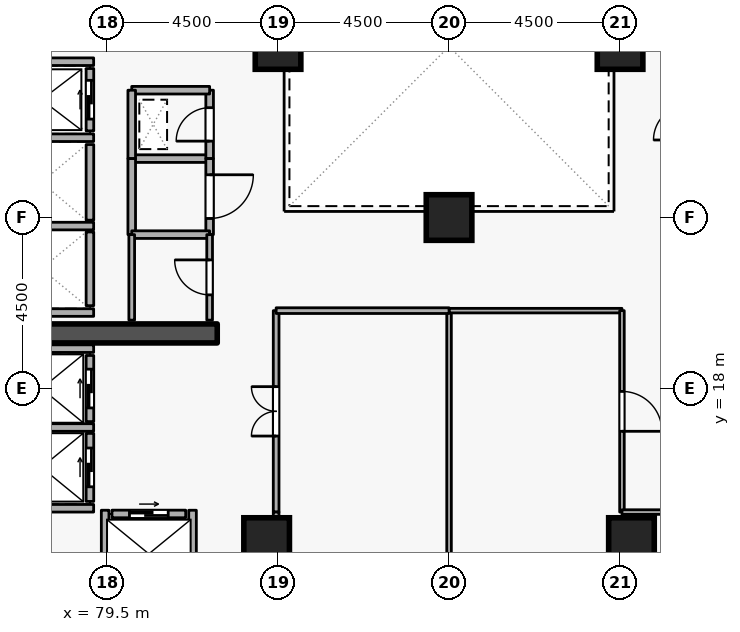
"""IFC4 building model, lengths in metres.
Left out: names, types, materials, properties, quantities, classifications, styles, units other than length and angle.
Written with IfcOpenShell. Run it as: python <this file> out.ifc"""

import sys

from ifc_helpers import new_model, si_unit, direction, frame, frame_2d, origin, origin_2d, place, context, subcontext, project, spatial, rectangle, extrude, element, fill, save


model = new_model("IFC4")
c1 = context("Model", 3, precision=1e-05, world=origin(), true_north=direction((0.0, 1.0)))
c2 = subcontext(c1, "Body", "Model", "MODEL_VIEW")
j1 = project(units=[si_unit("LENGTHUNIT", "METRE"), si_unit("PLANEANGLEUNIT", "RADIAN")], contexts=[c1])
p1 = place(None, origin())
s1 = spatial("IfcSite", under=j1, at=p1, CompositionType="ELEMENT")
p2 = place(p1, origin())
s2 = spatial("IfcBuilding", under=s1, at=p2, CompositionType="ELEMENT")
p3 = place(p2, frame((0.0, 0.0, 126.9)))
s3 = spatial("IfcBuildingStorey", under=s2, at=p3, CompositionType="ELEMENT", Elevation=126.9)
p4 = place(p3, frame((76.6, 19.45, 0.0), z_axis=(0.0, 0.0, 1.0), x_axis=(1.0, 0.0, 0.0)))
e1 = element("IfcWall", 1, at=p4, inside=s3, PredefinedType="SHEAR", context=c2, shape_type="SweptSolid", body=[
    extrude(rectangle(XDim=5.8, YDim=0.5, at=frame_2d((2.9, 0.0))), origin(), (0.0, 0.0, 1.0), 3.6),
])
for number, where, z_axis, x_axis in (
    (2, (93.3, 14.0, 0.0), (0.0, 0.0, 1.0), (1.0, 0.0, 0.0)),
    (3, (83.7, 14.0, 0.0), (0.0, 0.0, 1.0), (1.0, 0.0, 0.0)),
    (4, (93.0, 27.0, 0.0), (0.0, 0.0, 1.0), (1.0, 0.0, 0.0)),
    (5, (84.0, 27.0, 0.0), (0.0, 0.0, 1.0), (1.0, 0.0, 0.0)),
    (6, (88.5, 22.5, 0.0), (0.0, 0.0, 1.0), (1.0, 0.0, 0.0)),
):
    element("IfcColumn", number, at=place(p3, frame(where, z_axis=z_axis, x_axis=x_axis)), inside=s3, PredefinedType="COLUMN", context=c2, shape_type="SweptSolid", body=[
        extrude(rectangle(XDim=1.2, YDim=1.2, at=origin_2d()), origin(), (0.0, 0.0, 1.0), 3.6),
    ])
p5 = place(p3, frame((79.05, 24.78, 0.0), z_axis=(0.0, 0.0, 1.0), x_axis=(0.0, 1.0, 0.0)))
e7 = element("IfcWall", 7, at=p5, inside=s3, PredefinedType="STANDARD", context=c2, shape_type="SweptSolid", body=[
    extrude(rectangle(XDim=1.64, YDim=0.2, at=frame_2d((0.82, 0.0))), origin(), (0.0, 0.0, 1.0), 3.34),
])
p6 = place(p5, frame((0.31, 0.0, 0.0)))
e8 = element("IfcOpeningElement", 8, at=p6, cuts=e7, PredefinedType="OPENING", context=c2, shape_type="SweptSolid", body=[
    extrude(rectangle(XDim=1.02, YDim=2.06, at=frame_2d((0.51, 1.03))), frame((0.0, 0.11, 0.0), z_axis=(0.0, -1.0, 0.0), x_axis=(1.0, 0.0, 0.0)), (0.0, 0.0, 1.0), 0.22),
])
p7 = place(p3, frame((79.05, 22.43, 0.0), z_axis=(0.0, 0.0, 1.0), x_axis=(0.0, 1.0, 0.0)))
e9 = element("IfcWall", 9, at=p7, inside=s3, PredefinedType="STANDARD", context=c2, shape_type="SweptSolid", body=[
    extrude(rectangle(XDim=1.99, YDim=0.2, at=frame_2d((0.995, 0.0))), origin(), (0.0, 0.0, 1.0), 3.34),
])
p8 = place(p3, frame((79.05, 20.18, 0.0), z_axis=(0.0, 0.0, 1.0), x_axis=(0.0, 1.0, 0.0)))
e10 = element("IfcWall", 10, at=p8, inside=s3, PredefinedType="STANDARD", context=c2, shape_type="SweptSolid", body=[
    extrude(rectangle(XDim=1.94, YDim=0.2, at=frame_2d((0.97, 0.0))), origin(), (0.0, 0.0, 1.0), 3.34),
])
p9 = place(p3, frame((79.05, 17.13, 0.0), z_axis=(0.0, 0.0, 1.0), x_axis=(0.0, 1.0, 0.0)))
e11 = element("IfcWall", 11, at=p9, inside=s3, PredefinedType="STANDARD", context=c2, shape_type="SweptSolid", body=[
    extrude(rectangle(XDim=1.74, YDim=0.2, at=frame_2d((0.87, 0.0))), origin(), (0.0, 0.0, 1.0), 3.34),
])
p10 = place(p9, frame((0.36, 0.0, 0.0)))
e12 = element("IfcOpeningElement", 12, at=p10, cuts=e11, PredefinedType="OPENING", context=c2, shape_type="SweptSolid", body=[
    extrude(rectangle(XDim=1.02, YDim=2.06, at=frame_2d((0.51, 1.03))), frame((0.0, 0.11, 0.0), z_axis=(0.0, -1.0, 0.0), x_axis=(1.0, 0.0, 0.0)), (0.0, 0.0, 1.0), 0.22),
])
p11 = place(p3, frame((79.05, 15.03, 0.0), z_axis=(0.0, 0.0, 1.0), x_axis=(0.0, 1.0, 0.0)))
e13 = element("IfcWall", 13, at=p11, inside=s3, PredefinedType="STANDARD", context=c2, shape_type="SweptSolid", body=[
    extrude(rectangle(XDim=1.79, YDim=0.2, at=frame_2d((0.895, 0.0))), origin(), (0.0, 0.0, 1.0), 3.34),
])
p12 = place(p11, frame((0.385, 0.0, 0.0)))
e14 = element("IfcOpeningElement", 14, at=p12, cuts=e13, PredefinedType="OPENING", context=c2, shape_type="SweptSolid", body=[
    extrude(rectangle(XDim=1.02, YDim=2.06, at=frame_2d((0.51, 1.03))), frame((0.0, 0.11, 0.0), z_axis=(0.0, -1.0, 0.0), x_axis=(1.0, 0.0, 0.0)), (0.0, 0.0, 1.0), 0.22),
])
p13 = place(p3, frame((79.63, 14.7, 0.0), z_axis=(0.0, 0.0, 1.0), x_axis=(1.0, 0.0, 0.0)))
e15 = element("IfcWall", 15, at=p13, inside=s3, PredefinedType="STANDARD", context=c2, shape_type="SweptSolid", body=[
    extrude(rectangle(XDim=1.94, YDim=0.2, at=frame_2d((0.97, 0.0))), origin(), (0.0, 0.0, 1.0), 3.34),
])
p14 = place(p13, frame((0.46, 0.0, 0.0)))
e16 = element("IfcOpeningElement", 16, at=p14, cuts=e15, PredefinedType="OPENING", context=c2, shape_type="SweptSolid", body=[
    extrude(rectangle(XDim=1.02, YDim=2.06, at=frame_2d((0.51, 1.03))), frame((0.0, 0.11, 0.0), z_axis=(0.0, -1.0, 0.0), x_axis=(1.0, 0.0, 0.0)), (0.0, 0.0, 1.0), 0.22),
])
for number, where, z_axis, x_axis in (
    (17, (76.612, 26.6, 0.0), (0.0, 0.0, 1.0), (1.0, 0.0, 0.0)),
    (18, (76.612, 24.6, 0.0), (0.0, 0.0, 1.0), (1.0, 0.0, 0.0)),
    (19, (76.612, 22.275, 0.0), (0.0, 0.0, 1.0), (1.0, 0.0, 0.0)),
    (20, (76.612, 20.0, 0.0), (0.0, 0.0, 1.0), (1.0, 0.0, 0.0)),
):
    element("IfcWall", number, at=place(p3, frame(where, z_axis=z_axis, x_axis=x_axis)), inside=s3, PredefinedType="STANDARD", context=c2, shape_type="SweptSolid", body=[
        extrude(rectangle(XDim=2.536, YDim=0.2, at=frame_2d((1.268, 0.0))), origin(), (0.0, 0.0, 1.0), 3.34),
    ])
p15 = place(p3, frame((76.402, 19.05, 0.0), z_axis=(0.0, 0.0, 1.0), x_axis=(1.0, 0.0, 0.0)))
e21 = element("IfcWall", 21, at=p15, inside=s3, PredefinedType="STANDARD", context=c2, shape_type="SweptSolid", body=[
    extrude(rectangle(XDim=2.746, YDim=0.2, at=frame_2d((1.373, 0.0))), origin(), (0.0, 0.0, 1.0), 2.545),
])
p16 = place(p3, frame((76.402, 16.975, 0.0), z_axis=(0.0, 0.0, 1.0), x_axis=(1.0, 0.0, 0.0)))
e22 = element("IfcWall", 22, at=p16, inside=s3, PredefinedType="STANDARD", context=c2, shape_type="SweptSolid", body=[
    extrude(rectangle(XDim=2.746, YDim=0.2, at=frame_2d((1.373, 0.0))), origin(), (0.0, 0.0, 1.0), 3.34),
])
p17 = place(p3, frame((76.512, 14.85, 0.0), z_axis=(0.0, 0.0, 1.0), x_axis=(1.0, 0.0, 0.0)))
e23 = element("IfcWall", 23, at=p17, inside=s3, PredefinedType="STANDARD", context=c2, shape_type="SweptSolid", body=[
    extrude(rectangle(XDim=2.636, YDim=0.2, at=frame_2d((1.318, 0.0))), origin(), (0.0, 0.0, 1.0), 3.34),
])
for number, where, z_axis, x_axis in (
    (24, (81.75, 12.612, 0.0), (0.0, 0.0, 1.0), (0.0, 1.0, 0.0)),
    (25, (79.45, 12.612, 0.0), (0.0, 0.0, 1.0), (0.0, 1.0, 0.0)),
):
    element("IfcWall", number, at=place(p3, frame(where, z_axis=z_axis, x_axis=x_axis)), inside=s3, PredefinedType="STANDARD", context=c2, shape_type="SweptSolid", body=[
        extrude(rectangle(XDim=2.186, YDim=0.2, at=frame_2d((1.093, 0.0))), origin(), (0.0, 0.0, 1.0), 3.34),
    ])
p18 = place(p3, frame((80.15, 24.05, 0.0), z_axis=(0.0, 0.0, 1.0), x_axis=(1.0, 0.0, 0.0)))
e26 = element("IfcWall", 26, at=p18, inside=s3, PredefinedType="STANDARD", context=c2, shape_type="SweptSolid", body=[
    extrude(rectangle(XDim=2.05, YDim=0.2, at=frame_2d((1.025, 0.0))), origin(), (0.0, 0.0, 1.0), 3.34),
])
p19 = place(p3, frame((82.2, 24.05, 0.0), z_axis=(0.0, 0.0, 1.0), x_axis=(0.0, 1.0, 0.0)))
e27 = element("IfcWall", 27, at=p19, inside=s3, PredefinedType="STANDARD", context=c2, shape_type="SweptSolid", body=[
    extrude(rectangle(XDim=1.8, YDim=0.2, at=frame_2d((0.9, 0.0))), origin(), (0.0, 0.0, 1.0), 3.34),
])
p20 = place(p19, frame((0.46, 0.0, 0.0)))
e28 = element("IfcOpeningElement", 28, at=p20, cuts=e27, PredefinedType="OPENING", context=c2, shape_type="SweptSolid", body=[
    extrude(rectangle(XDim=0.88, YDim=2.04, at=frame_2d((0.44, 1.02))), frame((0.0, 0.11, 0.0), z_axis=(0.0, -1.0, 0.0), x_axis=(1.0, 0.0, 0.0)), (0.0, 0.0, 1.0), 0.22),
])
p21 = place(p3, frame((82.2, 25.85, 0.0), z_axis=(0.0, 0.0, 1.0), x_axis=(-1.0, 0.0, 0.0)))
e29 = element("IfcWall", 29, at=p21, inside=s3, PredefinedType="STANDARD", context=c2, shape_type="SweptSolid", body=[
    extrude(rectangle(XDim=2.05, YDim=0.2, at=frame_2d((1.025, 0.0))), origin(), (0.0, 0.0, 1.0), 3.34),
])
p22 = place(p3, frame((80.15, 25.85, 0.0), z_axis=(0.0, 0.0, 1.0), x_axis=(0.0, -1.0, 0.0)))
e30 = element("IfcWall", 30, at=p22, inside=s3, PredefinedType="STANDARD", context=c2, shape_type="SweptSolid", body=[
    extrude(rectangle(XDim=1.8, YDim=0.2, at=frame_2d((0.9, 0.0))), origin(), (0.0, 0.0, 1.0), 3.34),
])
p23 = place(p3, frame((80.15, 22.05, 0.0), z_axis=(0.0, 0.0, 1.0), x_axis=(0.0, 1.0, 0.0)))
e31 = element("IfcWall", 31, at=p23, inside=s3, PredefinedType="STANDARD", context=c2, shape_type="SweptSolid", body=[
    extrude(rectangle(XDim=2.0, YDim=0.2, at=frame_2d((1.0, 0.0))), origin(), (0.0, 0.0, 1.0), 3.34),
])
p24 = place(p3, frame((82.2, 24.05, 0.0), z_axis=(0.0, 0.0, 1.0), x_axis=(0.0, -1.0, 0.0)))
e32 = element("IfcWall", 32, at=p24, inside=s3, PredefinedType="STANDARD", context=c2, shape_type="SweptSolid", body=[
    extrude(rectangle(XDim=2.0, YDim=0.2, at=frame_2d((1.0, 0.0))), origin(), (0.0, 0.0, 1.0), 3.34),
])
p25 = place(p24, frame((0.425, 0.0, 0.0)))
e33 = element("IfcOpeningElement", 33, at=p25, cuts=e32, PredefinedType="OPENING", context=c2, shape_type="SweptSolid", body=[
    extrude(rectangle(XDim=1.15, YDim=2.1, at=frame_2d((0.575, 1.05))), frame((0.0, 0.11, 0.0), z_axis=(0.0, -1.0, 0.0), x_axis=(1.0, 0.0, 0.0)), (0.0, 0.0, 1.0), 0.22),
])
p26 = place(p3, frame((82.2, 22.05, 0.0), z_axis=(0.0, 0.0, 1.0), x_axis=(-1.0, 0.0, 0.0)))
e34 = element("IfcWall", 34, at=p26, inside=s3, PredefinedType="STANDARD", context=c2, shape_type="SweptSolid", body=[
    extrude(rectangle(XDim=2.05, YDim=0.2, at=frame_2d((1.025, 0.0))), origin(), (0.0, 0.0, 1.0), 3.34),
])
p27 = place(p3, frame((82.2, 19.8, 0.0), z_axis=(0.0, 0.0, 1.0), x_axis=(0.0, 1.0, 0.0)))
e35 = element("IfcWall", 35, at=p27, inside=s3, PredefinedType="PARTITIONING", context=c2, shape_type="SweptSolid", body=[
    extrude(rectangle(XDim=2.25, YDim=0.15, at=frame_2d((1.125, 0.0))), origin(), (0.0, 0.0, 1.0), 3.34),
])
p28 = place(p27, frame((0.665, 0.0, 0.0)))
e36 = element("IfcOpeningElement", 36, at=p28, cuts=e35, PredefinedType="OPENING", context=c2, shape_type="SweptSolid", body=[
    extrude(rectangle(XDim=0.92, YDim=2.08, at=frame_2d((0.46, 1.04))), frame((0.0, 0.085, 0.0), z_axis=(0.0, -1.0, 0.0), x_axis=(1.0, 0.0, 0.0)), (0.0, 0.0, 1.0), 0.17),
])
p29 = place(p3, frame((80.15, 22.05, 0.0), z_axis=(0.0, 0.0, 1.0), x_axis=(0.0, -1.0, 0.0)))
e37 = element("IfcWall", 37, at=p29, inside=s3, PredefinedType="PARTITIONING", context=c2, shape_type="SweptSolid", body=[
    extrude(rectangle(XDim=2.25, YDim=0.15, at=frame_2d((1.125, 0.0))), origin(), (0.0, 0.0, 1.0), 3.34),
])
p30 = place(p3, frame((88.5, 3.28, 0.0), z_axis=(0.0, 0.0, 1.0), x_axis=(0.0, 1.0, 0.0)))
e38 = element("IfcWall", 38, at=p30, inside=s3, PredefinedType="PARTITIONING", context=c2, shape_type="SweptSolid", body=[
    extrude(rectangle(XDim=16.77, YDim=0.12, at=frame_2d((8.385, 0.0))), origin(), (0.0, 0.0, 1.0), 2.932),
])
p31 = place(p3, frame((88.5, 20.05, 0.0), z_axis=(0.0, 0.0, 1.0), x_axis=(1.0, 0.0, 0.0)))
e39 = element("IfcWall", 39, at=p31, inside=s3, PredefinedType="PARTITIONING", context=c2, shape_type="SweptSolid", body=[
    extrude(rectangle(XDim=4.55, YDim=0.12, at=frame_2d((2.275, 0.0))), origin(), (0.0, 0.0, 1.0), 3.34),
])
p32 = place(p3, frame((93.05, 20.05, 0.0), z_axis=(0.0, 0.0, 1.0), x_axis=(0.0, -1.0, 0.0)))
e40 = element("IfcWall", 40, at=p32, inside=s3, PredefinedType="PARTITIONING", context=c2, shape_type="SweptSolid", body=[
    extrude(rectangle(XDim=5.3, YDim=0.12, at=frame_2d((2.65, 0.0))), origin(), (0.0, 0.0, 1.0), 3.34),
])
p33 = place(p32, frame((2.125, 0.0, 0.0)))
e41 = element("IfcOpeningElement", 41, at=p33, cuts=e40, PredefinedType="OPENING", context=c2, shape_type="SweptSolid", body=[
    extrude(rectangle(XDim=1.05, YDim=2.1, at=frame_2d((0.525, 1.05))), frame((0.0, 0.07, 0.0), z_axis=(0.0, -1.0, 0.0), x_axis=(1.0, 0.0, 0.0)), (0.0, 0.0, 1.0), 0.14),
])
p34 = place(p3, frame((93.05, 14.75, 0.0), z_axis=(0.0, 0.0, 1.0), x_axis=(1.0, 0.0, 0.0)))
e42 = element("IfcWall", 42, at=p34, inside=s3, PredefinedType="PARTITIONING", context=c2, shape_type="SweptSolid", body=[
    extrude(rectangle(XDim=1.75, YDim=0.12, at=frame_2d((0.875, 0.0))), origin(), (0.0, 0.0, 1.0), 3.34),
])
p35 = place(p3, frame((83.95, 14.75, 0.0), z_axis=(0.0, 0.0, 1.0), x_axis=(0.0, 1.0, 0.0)))
e43 = element("IfcWall", 43, at=p35, inside=s3, PredefinedType="PARTITIONING", context=c2, shape_type="SweptSolid", body=[
    extrude(rectangle(XDim=5.3, YDim=0.15, at=frame_2d((2.65, 0.0))), origin(), (0.0, 0.0, 1.0), 3.34),
])
p36 = place(p35, frame((2.0, 0.0, 0.0)))
e44 = element("IfcOpeningElement", 44, at=p36, cuts=e43, PredefinedType="OPENING", context=c2, shape_type="SweptSolid", body=[
    extrude(rectangle(XDim=1.3, YDim=2.12, at=frame_2d((0.65, 1.06))), frame((0.0, 0.085, 0.0), z_axis=(0.0, -1.0, 0.0), x_axis=(1.0, 0.0, 0.0)), (0.0, 0.0, 1.0), 0.17),
])
p37 = place(p3, frame((83.95, 20.05, 0.0), z_axis=(0.0, 0.0, 1.0), x_axis=(1.0, 0.0, 0.0)))
e45 = element("IfcWall", 45, at=p37, inside=s3, PredefinedType="PARTITIONING", context=c2, shape_type="SweptSolid", body=[
    extrude(rectangle(XDim=4.55, YDim=0.15, at=frame_2d((2.275, 0.0))), origin(), (0.0, 0.0, 1.0), 3.34),
])
p38 = place(p3, frame((83.95, 12.4, 0.0), z_axis=(0.0, 0.0, 1.0), x_axis=(0.0, 1.0, 0.0)))
e46 = element("IfcWall", 46, at=p38, inside=s3, PredefinedType="PARTITIONING", context=c2, shape_type="SweptSolid", body=[
    extrude(rectangle(XDim=2.35, YDim=0.15, at=frame_2d((1.175, 0.0))), origin(), (0.0, 0.0, 1.0), 3.34),
])
p39 = place(p6, origin())
e47 = element("IfcDoor", 47, at=p39, inside=s3, OperationType="SLIDING_TO_LEFT", PredefinedType="DOOR", context=c2, shape_type="SweptSolid", body=[
    extrude(rectangle(XDim=1.02, YDim=2.06, at=frame_2d((0.51, 1.03))), frame((0.0, 0.025, 0.0), z_axis=(0.0, -1.0, 0.0), x_axis=(1.0, 0.0, 0.0)), (0.0, 0.0, 1.0), 0.05),
])
fill(e8, e47)
p40 = place(p10, origin())
e48 = element("IfcDoor", 48, at=p40, inside=s3, OperationType="SLIDING_TO_LEFT", PredefinedType="DOOR", context=c2, shape_type="SweptSolid", body=[
    extrude(rectangle(XDim=1.02, YDim=2.06, at=frame_2d((0.51, 1.03))), frame((0.0, 0.025, 0.0), z_axis=(0.0, -1.0, 0.0), x_axis=(1.0, 0.0, 0.0)), (0.0, 0.0, 1.0), 0.05),
])
fill(e12, e48)
p41 = place(p12, origin())
e49 = element("IfcDoor", 49, at=p41, inside=s3, OperationType="SLIDING_TO_LEFT", PredefinedType="DOOR", context=c2, shape_type="SweptSolid", body=[
    extrude(rectangle(XDim=1.02, YDim=2.06, at=frame_2d((0.51, 1.03))), frame((0.0, 0.025, 0.0), z_axis=(0.0, -1.0, 0.0), x_axis=(1.0, 0.0, 0.0)), (0.0, 0.0, 1.0), 0.05),
])
fill(e14, e49)
p42 = place(p14, origin())
e50 = element("IfcDoor", 50, at=p42, inside=s3, OperationType="SLIDING_TO_LEFT", PredefinedType="DOOR", context=c2, shape_type="SweptSolid", body=[
    extrude(rectangle(XDim=1.02, YDim=2.06, at=frame_2d((0.51, 1.03))), frame((0.0, 0.025, 0.0), z_axis=(0.0, -1.0, 0.0), x_axis=(1.0, 0.0, 0.0)), (0.0, 0.0, 1.0), 0.05),
])
fill(e16, e50)
p43 = place(p20, origin())
e51 = element("IfcDoor", 51, at=p43, inside=s3, OperationType="SINGLE_SWING_LEFT", PredefinedType="DOOR", context=c2, shape_type="SweptSolid", body=[
    extrude(rectangle(XDim=0.88, YDim=2.04, at=frame_2d((0.44, 1.02))), frame((0.0, 0.025, 0.0), z_axis=(0.0, -1.0, 0.0), x_axis=(1.0, 0.0, 0.0)), (0.0, 0.0, 1.0), 0.05),
])
fill(e28, e51)
p44 = place(p28, origin())
e52 = element("IfcDoor", 52, at=p44, inside=s3, OperationType="SINGLE_SWING_RIGHT", PredefinedType="DOOR", context=c2, shape_type="SweptSolid", body=[
    extrude(rectangle(XDim=0.92, YDim=2.08, at=frame_2d((0.46, 1.04))), frame((0.0, 0.025, 0.0), z_axis=(0.0, -1.0, 0.0), x_axis=(1.0, 0.0, 0.0)), (0.0, 0.0, 1.0), 0.05),
])
fill(e36, e52)
p45 = place(p25, origin())
e53 = element("IfcDoor", 53, at=p45, inside=s3, OperationType="SINGLE_SWING_LEFT", PredefinedType="DOOR", context=c2, shape_type="SweptSolid", body=[
    extrude(rectangle(XDim=1.15, YDim=2.1, at=frame_2d((0.575, 1.05))), frame((0.0, 0.025, 0.0), z_axis=(0.0, -1.0, 0.0), x_axis=(1.0, 0.0, 0.0)), (0.0, 0.0, 1.0), 0.05),
])
fill(e33, e53)
p46 = place(p33, origin())
e54 = element("IfcDoor", 54, at=p46, inside=s3, OperationType="SINGLE_SWING_RIGHT", PredefinedType="DOOR", context=c2, shape_type="SweptSolid", body=[
    extrude(rectangle(XDim=1.05, YDim=2.1, at=frame_2d((0.525, 1.05))), frame((0.0, 0.025, 0.0), z_axis=(0.0, -1.0, 0.0), x_axis=(1.0, 0.0, 0.0)), (0.0, 0.0, 1.0), 0.05),
])
fill(e41, e54)
p47 = place(p36, origin())
e55 = element("IfcDoor", 55, at=p47, inside=s3, OperationType="DOUBLE_DOOR_SINGLE_SWING", PredefinedType="DOOR", context=c2, shape_type="SweptSolid", body=[
    extrude(rectangle(XDim=1.3, YDim=2.12, at=frame_2d((0.65, 1.06))), frame((0.0, 0.025, 0.0), z_axis=(0.0, -1.0, 0.0), x_axis=(1.0, 0.0, 0.0)), (0.0, 0.0, 1.0), 0.05),
])
fill(e44, e55)
save(model, sys.argv[1])
